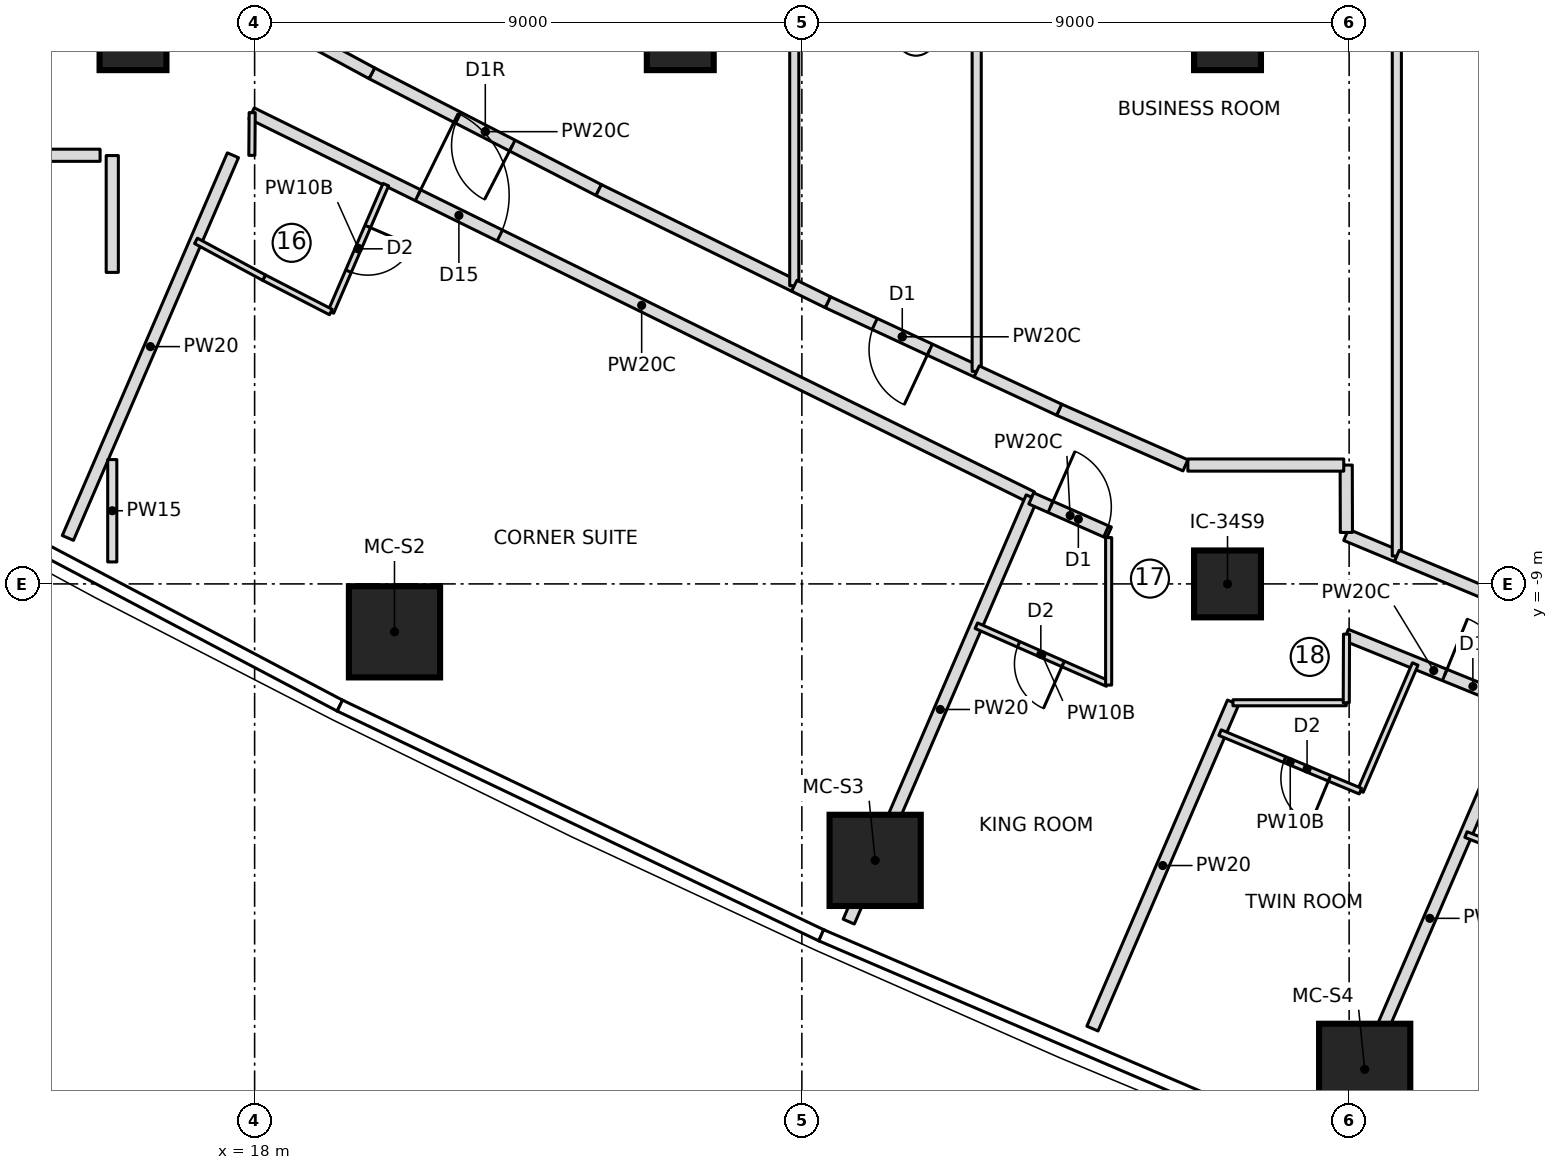
"""IFC4 building model, lengths in metres.
Left out: names, types, materials, properties, quantities, classifications, styles, units other than length and angle.
Written with IfcOpenShell. Run it as: python <this file> out.ifc"""

import sys

from ifc_helpers import new_model, si_unit, direction, frame, frame_2d, origin, origin_2d, place, context, subcontext, project, spatial, rectangle, extrude, element, fill, save


model = new_model("IFC4")
c1 = context("Model", 3, precision=1e-05, world=origin(), true_north=direction((0.0, 1.0)))
c2 = subcontext(c1, "Body", "Model", "MODEL_VIEW")
j1 = project(units=[si_unit("LENGTHUNIT", "METRE"), si_unit("PLANEANGLEUNIT", "RADIAN")], contexts=[c1])
p1 = place(None, origin())
s1 = spatial("IfcSite", under=j1, at=p1, CompositionType="ELEMENT")
p2 = place(p1, origin())
s2 = spatial("IfcBuilding", under=s1, at=p2, CompositionType="ELEMENT")
p3 = place(p2, frame((0.0, 0.0, 147.95)))
s3 = spatial("IfcBuildingStorey", under=s2, at=p3, CompositionType="ELEMENT", Elevation=147.95)
for number, where, z_axis, x_axis in (
    (1, (20.3, -9.788, 0.0), (0.0, 0.0, 1.0), (1.0, 0.0, 0.0)),
    (2, (28.205, -13.547, 0.0), (0.0, 0.0, 1.0), (1.0, 0.0, 0.0)),
    (3, (36.256, -16.984, 0.0), (0.0, 0.0, 1.0), (1.0, 0.0, 0.0)),
):
    element("IfcColumn", number, at=place(p3, frame(where, z_axis=z_axis, x_axis=x_axis)), inside=s3, PredefinedType="COLUMN", context=c2, shape_type="SweptSolid", body=[
        extrude(rectangle(XDim=1.5, YDim=1.5, at=origin_2d()), origin(), (0.0, 0.0, 1.0), 3.55),
    ])
for number, where, z_axis, x_axis in (
    (4, (16.0, 0.0, 0.0), (0.0, 0.0, 1.0), (1.0, 0.0, 0.0)),
    (5, (25.0, 0.0, 0.0), (0.0, 0.0, 1.0), (1.0, 0.0, 0.0)),
    (6, (34.0, -9.0, 0.0), (0.0, 0.0, 1.0), (1.0, 0.0, 0.0)),
    (7, (34.0, 0.0, 0.0), (0.0, 0.0, 1.0), (1.0, 0.0, 0.0)),
):
    element("IfcColumn", number, at=place(p3, frame(where, z_axis=z_axis, x_axis=x_axis)), inside=s3, PredefinedType="COLUMN", context=c2, shape_type="SweptSolid", body=[
        extrude(rectangle(XDim=1.1, YDim=1.1, at=origin_2d()), origin(), (0.0, 0.0, 1.0), 3.55),
    ])
p4 = place(p3, frame((5.654, -1.95, 0.0), z_axis=(0.0, 0.0, 1.0), x_axis=(1.0, 0.0, 0.0)))
e8 = element("IfcWall", 8, at=p4, inside=s3, PredefinedType="PARTITIONING", context=c2, shape_type="SweptSolid", body=[
    extrude(rectangle(XDim=9.804, YDim=0.2, at=frame_2d((4.902, 0.0))), origin(), (0.0, 0.0, 1.0), 3.25),
])
p5 = place(p4, frame((4.618, 0.0, 0.0)))
e9 = element("IfcOpeningElement", 9, at=p5, cuts=e8, PredefinedType="OPENING", context=c2, shape_type="SweptSolid", body=[
    extrude(rectangle(XDim=1.0, YDim=2.1, at=frame_2d((0.5, 1.05))), frame((0.0, 0.11, 0.0), z_axis=(0.0, -1.0, 0.0), x_axis=(1.0, 0.0, 0.0)), (0.0, 0.0, 1.0), 0.22),
])
p6 = place(p3, frame((14.929, -8.244, 0.0), z_axis=(0.0, 0.0, 1.0), x_axis=(0.395994543879, 0.918252863441, 0.0)))
e10 = element("IfcWall", 10, at=p6, inside=s3, PredefinedType="PARTITIONING", context=c2, shape_type="SweptSolid", body=[
    extrude(rectangle(XDim=6.854, YDim=0.2, at=frame_2d((3.427, 0.0))), origin(), (0.0, 0.0, 1.0), 3.25),
])
p7 = place(p3, frame((17.95, -1.261, 0.0), z_axis=(0.0, 0.0, 1.0), x_axis=(0.897223022069, -0.441577681353, 0.0)))
e11 = element("IfcWall", 11, at=p7, inside=s3, PredefinedType="PARTITIONING", context=c2, shape_type="SweptSolid", body=[
    extrude(rectangle(XDim=14.3, YDim=0.2, at=frame_2d((7.15, 0.0))), origin(), (0.0, 0.0, 1.0), 3.25),
])
p8 = place(p7, frame((3.05, 0.0, 0.0)))
e12 = element("IfcOpeningElement", 12, at=p8, cuts=e11, PredefinedType="OPENING", context=c2, shape_type="SweptSolid", body=[
    extrude(rectangle(XDim=1.5, YDim=2.1, at=frame_2d((0.75, 1.05))), frame((0.0, 0.11, 0.0), z_axis=(0.0, -1.0, 0.0), x_axis=(1.0, 0.0, 0.0)), (0.0, 0.0, 1.0), 0.22),
])
p9 = place(p3, frame((20.157, -2.433, 0.0), z_axis=(0.0, 0.0, 1.0), x_axis=(-0.395958457437, -0.9182684248, 0.0)))
e13 = element("IfcWall", 13, at=p9, inside=s3, PredefinedType="PARTITIONING", context=c2, shape_type="SweptSolid", body=[
    extrude(rectangle(XDim=2.282, YDim=0.1, at=frame_2d((1.141, 0.0))), origin(), (0.0, 0.0, 1.0), 3.25),
])
p10 = place(p9, frame((0.75, 0.0, 0.0)))
e14 = element("IfcOpeningElement", 14, at=p10, cuts=e13, PredefinedType="OPENING", context=c2, shape_type="SweptSolid", body=[
    extrude(rectangle(XDim=0.8, YDim=2.1, at=frame_2d((0.4, 1.05))), frame((0.0, 0.06, 0.0), z_axis=(0.0, -1.0, 0.0), x_axis=(1.0, 0.0, 0.0)), (0.0, 0.0, 1.0), 0.12),
])
p11 = place(p3, frame((19.253, -4.529, 0.0), z_axis=(0.0, 0.0, 1.0), x_axis=(-0.889106231322, 0.457700895154, 0.0)))
e15 = element("IfcWall", 15, at=p11, inside=s3, PredefinedType="PARTITIONING", context=c2, shape_type="SweptSolid", body=[
    extrude(rectangle(XDim=1.235, YDim=0.1, at=frame_2d((0.617, 0.0))), origin(), (0.0, 0.0, 1.0), 3.25),
])
p12 = place(p3, frame((18.156, -3.963, 0.0), z_axis=(0.0, 0.0, 1.0), x_axis=(-0.879823588489, 0.475300382009, 0.0)))
e16 = element("IfcWall", 16, at=p12, inside=s3, PredefinedType="PARTITIONING", context=c2, shape_type="SweptSolid", body=[
    extrude(rectangle(XDim=1.273, YDim=0.1, at=frame_2d((0.636, 0.0))), origin(), (0.0, 0.0, 1.0), 3.25),
])
p13 = place(p3, frame((27.771, -14.554, 0.0), z_axis=(0.0, 0.0, 1.0), x_axis=(0.396004020147, 0.918248776763, 0.0)))
e17 = element("IfcWall", 17, at=p13, inside=s3, PredefinedType="PARTITIONING", context=c2, shape_type="SweptSolid", body=[
    extrude(rectangle(XDim=7.6, YDim=0.2, at=frame_2d((3.8, 0.0))), origin(), (0.0, 0.0, 1.0), 3.25),
])
p14 = place(p3, frame((30.772, -7.594, 0.0), z_axis=(0.0, 0.0, 1.0), x_axis=(0.915155082005, -0.403101942293, 0.0)))
e18 = element("IfcWall", 18, at=p14, inside=s3, PredefinedType="PARTITIONING", context=c2, shape_type="SweptSolid", body=[
    extrude(rectangle(XDim=1.396, YDim=0.2, at=frame_2d((0.698, 0.0))), origin(), (0.0, 0.0, 1.0), 3.25),
])
p15 = place(p14, frame((0.346, 0.0, 0.0)))
e19 = element("IfcOpeningElement", 19, at=p15, cuts=e18, PredefinedType="OPENING", context=c2, shape_type="SweptSolid", body=[
    extrude(rectangle(XDim=1.0, YDim=2.1, at=frame_2d((0.5, 1.05))), frame((0.0, 0.11, 0.0), z_axis=(0.0, -1.0, 0.0), x_axis=(1.0, 0.0, 0.0)), (0.0, 0.0, 1.0), 0.22),
])
p16 = place(p3, frame((32.028, -10.638, 0.0), z_axis=(0.0, 0.0, 1.0), x_axis=(-0.915108845766, 0.403206895278, 0.0)))
e20 = element("IfcWall", 20, at=p16, inside=s3, PredefinedType="PARTITIONING", context=c2, shape_type="SweptSolid", body=[
    extrude(rectangle(XDim=2.358, YDim=0.1, at=frame_2d((1.179, 0.0))), origin(), (0.0, 0.0, 1.0), 3.25),
])
p17 = place(p16, frame((0.8, 0.0, 0.0)))
e21 = element("IfcOpeningElement", 21, at=p17, cuts=e20, PredefinedType="OPENING", context=c2, shape_type="SweptSolid", body=[
    extrude(rectangle(XDim=0.8, YDim=2.1, at=frame_2d((0.4, 1.05))), frame((0.0, 0.06, 0.0), z_axis=(0.0, -1.0, 0.0), x_axis=(1.0, 0.0, 0.0)), (0.0, 0.0, 1.0), 0.12),
])
p18 = place(p3, frame((31.779, -16.313, 0.0), z_axis=(0.0, 0.0, 1.0), x_axis=(0.395991607501, 0.918254129742, 0.0)))
e22 = element("IfcWall", 22, at=p18, inside=s3, PredefinedType="PARTITIONING", context=c2, shape_type="SweptSolid", body=[
    extrude(rectangle(XDim=5.841, YDim=0.2, at=frame_2d((2.92, 0.0))), origin(), (0.0, 0.0, 1.0), 3.25),
])
p19 = place(p3, frame((35.95, -9.84, 0.0), z_axis=(0.0, 0.0, 1.0), x_axis=(0.926663171188, -0.375892760191, 0.0)))
e23 = element("IfcWall", 23, at=p19, inside=s3, PredefinedType="PARTITIONING", context=c2, shape_type="SweptSolid", body=[
    extrude(rectangle(XDim=3.11, YDim=0.2, at=frame_2d((1.555, 0.0))), origin(), (0.0, 0.0, 1.0), 3.25),
])
p20 = place(p19, frame((1.75, 0.0, 0.0)))
e24 = element("IfcOpeningElement", 24, at=p20, cuts=e23, PredefinedType="OPENING", context=c2, shape_type="SweptSolid", body=[
    extrude(rectangle(XDim=1.0, YDim=2.1, at=frame_2d((0.5, 1.05))), frame((0.0, 0.11, 0.0), z_axis=(0.0, -1.0, 0.0), x_axis=(1.0, 0.0, 0.0)), (0.0, 0.0, 1.0), 0.22),
])
p21 = place(p3, frame((37.087, -10.317, 0.0), z_axis=(0.0, 0.0, 1.0), x_axis=(-0.395936907069, -0.918277717045, 0.0)))
e25 = element("IfcWall", 25, at=p21, inside=s3, PredefinedType="PARTITIONING", context=c2, shape_type="SweptSolid", body=[
    extrude(rectangle(XDim=2.277, YDim=0.1, at=frame_2d((1.139, 0.0))), origin(), (0.0, 0.0, 1.0), 3.25),
])
p22 = place(p3, frame((36.185, -12.408, 0.0), z_axis=(0.0, 0.0, 1.0), x_axis=(-0.923033583854, 0.384719382248, 0.0)))
e26 = element("IfcWall", 26, at=p22, inside=s3, PredefinedType="PARTITIONING", context=c2, shape_type="SweptSolid", body=[
    extrude(rectangle(XDim=2.5, YDim=0.1, at=frame_2d((1.25, 0.0))), origin(), (0.0, 0.0, 1.0), 3.25),
])
p23 = place(p22, frame((0.55, 0.0, 0.0)))
e27 = element("IfcOpeningElement", 27, at=p23, cuts=e26, PredefinedType="OPENING", context=c2, shape_type="SweptSolid", body=[
    extrude(rectangle(XDim=0.8, YDim=2.1, at=frame_2d((0.4, 1.05))), frame((0.0, 0.06, 0.0), z_axis=(0.0, -1.0, 0.0), x_axis=(1.0, 0.0, 0.0)), (0.0, 0.0, 1.0), 0.12),
])
p24 = place(p3, frame((35.821, -17.991, 0.0), z_axis=(0.0, 0.0, 1.0), x_axis=(0.395987603644, 0.918255856371, 0.0)))
e28 = element("IfcWall", 28, at=p24, inside=s3, PredefinedType="PARTITIONING", context=c2, shape_type="SweptSolid", body=[
    extrude(rectangle(XDim=7.604, YDim=0.2, at=frame_2d((3.802, 0.0))), origin(), (0.0, 0.0, 1.0), 3.25),
])
p25 = place(p3, frame((40.249, -14.038, 0.0), z_axis=(0.0, 0.0, 1.0), x_axis=(-0.930555592459, 0.366150637503, 0.0)))
e29 = element("IfcWall", 29, at=p25, inside=s3, PredefinedType="PARTITIONING", context=c2, shape_type="SweptSolid", body=[
    extrude(rectangle(XDim=2.501, YDim=0.1, at=frame_2d((1.25, 0.0))), origin(), (0.0, 0.0, 1.0), 3.25),
])
p26 = place(p25, frame((0.85, 0.0, 0.0)))
e30 = element("IfcOpeningElement", 30, at=p26, cuts=e29, PredefinedType="OPENING", context=c2, shape_type="SweptSolid", body=[
    extrude(rectangle(XDim=0.8, YDim=2.1, at=frame_2d((0.4, 1.05))), frame((0.0, 0.06, 0.0), z_axis=(0.0, -1.0, 0.0), x_axis=(1.0, 0.0, 0.0)), (0.0, 0.0, 1.0), 0.12),
])
p27 = place(p3, frame((23.659, -2.522, 0.0), z_axis=(0.0, 0.0, 1.0), x_axis=(-0.889140337289, 0.457634636589, 0.0)))
e31 = element("IfcWall", 31, at=p27, inside=s3, PredefinedType="PARTITIONING", context=c2, shape_type="SweptSolid", body=[
    extrude(rectangle(XDim=4.195, YDim=0.2, at=frame_2d((2.098, 0.0))), origin(), (0.0, 0.0, 1.0), 3.25),
])
p28 = place(p27, frame((1.598, 0.0, 0.0)))
e32 = element("IfcOpeningElement", 32, at=p28, cuts=e31, PredefinedType="OPENING", context=c2, shape_type="SweptSolid", body=[
    extrude(rectangle(XDim=1.0, YDim=2.1, at=frame_2d((0.5, 1.05))), frame((0.0, 0.11, 0.0), z_axis=(0.0, -1.0, 0.0), x_axis=(1.0, 0.0, 0.0)), (0.0, 0.0, 1.0), 0.22),
])
p29 = place(p3, frame((19.928, -0.602, 0.0), z_axis=(0.0, 0.0, 1.0), x_axis=(-0.879832865766, 0.475283208538, 0.0)))
e33 = element("IfcWall", 33, at=p29, inside=s3, PredefinedType="PARTITIONING", context=c2, shape_type="SweptSolid", body=[
    extrude(rectangle(XDim=1.267, YDim=0.2, at=frame_2d((0.633, 0.0))), origin(), (0.0, 0.0, 1.0), 3.25),
])
p30 = place(p3, frame((26.875, -4.096, 0.0), z_axis=(0.0, 0.0, 1.0), x_axis=(-0.898158871209, 0.439671061214, 0.0)))
e34 = element("IfcWall", 34, at=p30, inside=s3, PredefinedType="PARTITIONING", context=c2, shape_type="SweptSolid", body=[
    extrude(rectangle(XDim=3.581, YDim=0.2, at=frame_2d((1.791, 0.0))), origin(), (0.0, 0.0, 1.0), 3.25),
])
p31 = place(p3, frame((26.875, -4.096, 0.0), z_axis=(0.0, 0.0, 1.0), x_axis=(0.0, 1.0, 0.0)))
e35 = element("IfcWall", 35, at=p31, inside=s3, PredefinedType="PARTITIONING", context=c2, shape_type="SweptSolid", body=[
    extrude(rectangle(XDim=8.193, YDim=0.15, at=frame_2d((4.096, 0.0))), origin(), (0.0, 0.0, 1.0), 3.25),
])
p32 = place(p3, frame((29.875, -5.505, 0.0), z_axis=(0.0, 0.0, 1.0), x_axis=(-0.906831253463, 0.421493864419, 0.0)))
e36 = element("IfcWall", 36, at=p32, inside=s3, PredefinedType="PARTITIONING", context=c2, shape_type="SweptSolid", body=[
    extrude(rectangle(XDim=2.7, YDim=0.2, at=frame_2d((1.35, 0.0))), origin(), (0.0, 0.0, 1.0), 3.25),
])
p33 = place(p32, frame((0.85, 0.0, 0.0)))
e37 = element("IfcOpeningElement", 37, at=p33, cuts=e36, PredefinedType="OPENING", context=c2, shape_type="SweptSolid", body=[
    extrude(rectangle(XDim=1.0, YDim=2.1, at=frame_2d((0.5, 1.05))), frame((0.0, 0.11, 0.0), z_axis=(0.0, -1.0, 0.0), x_axis=(1.0, 0.0, 0.0)), (0.0, 0.0, 1.0), 0.22),
])
p34 = place(p3, frame((27.427, -4.367, 0.0), z_axis=(0.0, 0.0, 1.0), x_axis=(-0.898053097245, 0.439887070199, 0.0)))
e38 = element("IfcWall", 38, at=p34, inside=s3, PredefinedType="PARTITIONING", context=c2, shape_type="SweptSolid", body=[
    extrude(rectangle(XDim=0.615, YDim=0.2, at=frame_2d((0.307, 0.0))), origin(), (0.0, 0.0, 1.0), 3.25),
])
p35 = place(p3, frame((29.875, -5.505, 0.0), z_axis=(0.0, 0.0, 1.0), x_axis=(0.0, 1.0, 0.0)))
e39 = element("IfcWall", 39, at=p35, inside=s3, PredefinedType="PARTITIONING", context=c2, shape_type="SweptSolid", body=[
    extrude(rectangle(XDim=11.009, YDim=0.15, at=frame_2d((5.505, 0.0))), origin(), (0.0, 0.0, 1.0), 3.25),
])
p36 = place(p3, frame((36.784, -8.541, 0.0), z_axis=(0.0, 0.0, 1.0), x_axis=(-0.922997009646, 0.384807120756, 0.0)))
e40 = element("IfcWall", 40, at=p36, inside=s3, PredefinedType="PARTITIONING", context=c2, shape_type="SweptSolid", body=[
    extrude(rectangle(XDim=0.904, YDim=0.2, at=frame_2d((0.452, 0.0))), origin(), (0.0, 0.0, 1.0), 3.25),
])
p37 = place(p3, frame((33.308, -7.05, 0.0), z_axis=(0.0, 0.0, 1.0), x_axis=(-0.915102334452, 0.403221672881, 0.0)))
e41 = element("IfcWall", 41, at=p37, inside=s3, PredefinedType="PARTITIONING", context=c2, shape_type="SweptSolid", body=[
    extrude(rectangle(XDim=2.269, YDim=0.2, at=frame_2d((1.135, 0.0))), origin(), (0.0, 0.0, 1.0), 3.25),
])
p38 = place(p3, frame((31.231, -6.135, 0.0), z_axis=(0.0, 0.0, 1.0), x_axis=(-0.90682850945, 0.421499768029, 0.0)))
e42 = element("IfcWall", 42, at=p38, inside=s3, PredefinedType="PARTITIONING", context=c2, shape_type="SweptSolid", body=[
    extrude(rectangle(XDim=1.496, YDim=0.2, at=frame_2d((0.748, 0.0))), origin(), (0.0, 0.0, 1.0), 3.25),
])
p39 = place(p3, frame((36.784, -8.541, 0.0), z_axis=(0.0, 0.0, 1.0), x_axis=(0.0, 1.0, 0.0)))
e43 = element("IfcWall", 43, at=p39, inside=s3, PredefinedType="PARTITIONING", context=c2, shape_type="SweptSolid", body=[
    extrude(rectangle(XDim=17.082, YDim=0.15, at=frame_2d((8.541, 0.0))), origin(), (0.0, 0.0, 1.0), 3.25),
])
p40 = place(p3, frame((38.943, -9.441, 0.0), z_axis=(0.0, 0.0, 1.0), x_axis=(-0.923008963065, 0.384778448073, 0.0)))
e44 = element("IfcWall", 44, at=p40, inside=s3, PredefinedType="PARTITIONING", context=c2, shape_type="SweptSolid", body=[
    extrude(rectangle(XDim=2.339, YDim=0.2, at=frame_2d((1.169, 0.0))), origin(), (0.0, 0.0, 1.0), 3.25),
])
p41 = place(p3, frame((15.659, -6.955, 0.0), z_axis=(0.0, 0.0, 1.0), x_axis=(0.0, -1.0, 0.0)))
e45 = element("IfcWall", 45, at=p41, inside=s3, PredefinedType="PARTITIONING", context=c2, shape_type="SweptSolid", body=[
    extrude(rectangle(XDim=1.684, YDim=0.15, at=frame_2d((0.842, 0.0))), origin(), (0.0, 0.0, 1.0), 3.25),
])
p42 = place(p3, frame((17.955, -1.952, 0.0), z_axis=(0.0, 0.0, 1.0), x_axis=(0.007291472831, 0.999973416859, 0.0)))
e46 = element("IfcWall", 46, at=p42, inside=s3, PredefinedType="PARTITIONING", context=c2, shape_type="SweptSolid", body=[
    extrude(rectangle(XDim=0.703, YDim=0.1, at=frame_2d((0.352, 0.0))), origin(), (0.0, 0.0, 1.0), 3.25),
])
p43 = place(p3, frame((32.045, -8.238, 0.0), z_axis=(0.0, 0.0, 1.0), x_axis=(0.0, -1.0, 0.0)))
e47 = element("IfcWall", 47, at=p43, inside=s3, PredefinedType="PARTITIONING", context=c2, shape_type="SweptSolid", body=[
    extrude(rectangle(XDim=2.426, YDim=0.1, at=frame_2d((1.213, 0.0))), origin(), (0.0, 0.0, 1.0), 3.25),
])
p44 = place(p3, frame((34.089, -10.955, 0.0), z_axis=(0.0, 0.0, 1.0), x_axis=(0.999999862691, 0.000524040279, 0.0)))
e48 = element("IfcWall", 48, at=p44, inside=s3, PredefinedType="PARTITIONING", context=c2, shape_type="SweptSolid", body=[
    extrude(rectangle(XDim=1.864, YDim=0.1, at=frame_2d((0.932, 0.0))), origin(), (0.0, 0.0, 1.0), 3.25),
])
p45 = place(p3, frame((35.953, -10.954, 0.0), z_axis=(0.0, 0.0, 1.0), x_axis=(0.00368122235, 0.999993224278, 0.0)))
e49 = element("IfcWall", 49, at=p45, inside=s3, PredefinedType="PARTITIONING", context=c2, shape_type="SweptSolid", body=[
    extrude(rectangle(XDim=1.127, YDim=0.1, at=frame_2d((0.564, 0.0))), origin(), (0.0, 0.0, 1.0), 3.25),
])
p46 = place(p3, frame((35.955, -8.154, 0.0), z_axis=(0.0, 0.0, 1.0), x_axis=(-0.002643744892, 0.9999965053, 0.0)))
e50 = element("IfcWall", 50, at=p46, inside=s3, PredefinedType="PARTITIONING", context=c2, shape_type="SweptSolid", body=[
    extrude(rectangle(XDim=1.108, YDim=0.2, at=frame_2d((0.554, 0.0))), origin(), (0.0, 0.0, 1.0), 3.25),
])
p47 = place(p3, frame((35.912, -7.045, 0.0), z_axis=(0.0, 0.0, 1.0), x_axis=(-0.999999981873, 0.000190403652, 0.0)))
e51 = element("IfcWall", 51, at=p47, inside=s3, PredefinedType="PARTITIONING", context=c2, shape_type="SweptSolid", body=[
    extrude(rectangle(XDim=2.564, YDim=0.2, at=frame_2d((1.282, 0.0))), origin(), (0.0, 0.0, 1.0), 3.25),
])
p48 = place(p3, frame((15.659, -1.955, 0.0), z_axis=(0.0, 0.0, 1.0), x_axis=(0.0, -1.0, 0.0)))
e52 = element("IfcWall", 52, at=p48, inside=s3, PredefinedType="PARTITIONING", context=c2, shape_type="SweptSolid", body=[
    extrude(rectangle(XDim=1.922, YDim=0.2, at=frame_2d((0.961, 0.0))), origin(), (0.0, 0.0, 1.0), 3.25),
])
p49 = place(p10, origin())
e53 = element("IfcDoor", 53, at=p49, inside=s3, OperationType="SINGLE_SWING_LEFT", PredefinedType="DOOR", context=c2, shape_type="SweptSolid", body=[
    extrude(rectangle(XDim=0.8, YDim=2.1, at=frame_2d((0.4, 1.05))), frame((0.0, 0.025, 0.0), z_axis=(0.0, -1.0, 0.0), x_axis=(1.0, 0.0, 0.0)), (0.0, 0.0, 1.0), 0.05),
])
fill(e14, e53)
p50 = place(p8, origin())
e54 = element("IfcDoor", 54, at=p50, inside=s3, OperationType="DOUBLE_DOOR_SINGLE_SWING", PredefinedType="DOOR", context=c2, shape_type="SweptSolid", body=[
    extrude(rectangle(XDim=1.5, YDim=2.1, at=frame_2d((0.75, 1.05))), frame((0.0, 0.025, 0.0), z_axis=(0.0, -1.0, 0.0), x_axis=(1.0, 0.0, 0.0)), (0.0, 0.0, 1.0), 0.05),
])
fill(e12, e54)
p51 = place(p17, origin())
e55 = element("IfcDoor", 55, at=p51, inside=s3, OperationType="SINGLE_SWING_LEFT", PredefinedType="DOOR", context=c2, shape_type="SweptSolid", body=[
    extrude(rectangle(XDim=0.8, YDim=2.1, at=frame_2d((0.4, 1.05))), frame((0.0, 0.025, 0.0), z_axis=(0.0, -1.0, 0.0), x_axis=(1.0, 0.0, 0.0)), (0.0, 0.0, 1.0), 0.05),
])
fill(e21, e55)
p52 = place(p15, origin())
e56 = element("IfcDoor", 56, at=p52, inside=s3, OperationType="SINGLE_SWING_LEFT", PredefinedType="DOOR", context=c2, shape_type="SweptSolid", body=[
    extrude(rectangle(XDim=1.0, YDim=2.1, at=frame_2d((0.5, 1.05))), frame((0.0, 0.025, 0.0), z_axis=(0.0, -1.0, 0.0), x_axis=(1.0, 0.0, 0.0)), (0.0, 0.0, 1.0), 0.05),
])
fill(e19, e56)
p53 = place(p23, origin())
e57 = element("IfcDoor", 57, at=p53, inside=s3, OperationType="SINGLE_SWING_LEFT", PredefinedType="DOOR", context=c2, shape_type="SweptSolid", body=[
    extrude(rectangle(XDim=0.8, YDim=2.1, at=frame_2d((0.4, 1.05))), frame((0.0, 0.025, 0.0), z_axis=(0.0, -1.0, 0.0), x_axis=(1.0, 0.0, 0.0)), (0.0, 0.0, 1.0), 0.05),
])
fill(e27, e57)
p54 = place(p20, origin())
e58 = element("IfcDoor", 58, at=p54, inside=s3, OperationType="SINGLE_SWING_LEFT", PredefinedType="DOOR", context=c2, shape_type="SweptSolid", body=[
    extrude(rectangle(XDim=1.0, YDim=2.1, at=frame_2d((0.5, 1.05))), frame((0.0, 0.025, 0.0), z_axis=(0.0, -1.0, 0.0), x_axis=(1.0, 0.0, 0.0)), (0.0, 0.0, 1.0), 0.05),
])
fill(e24, e58)
p55 = place(p28, origin())
e59 = element("IfcDoor", 59, at=p55, inside=s3, OperationType="SINGLE_SWING_RIGHT", PredefinedType="DOOR", context=c2, shape_type="SweptSolid", body=[
    extrude(rectangle(XDim=1.0, YDim=2.1, at=frame_2d((0.5, 1.05))), frame((0.0, 0.025, 0.0), z_axis=(0.0, -1.0, 0.0), x_axis=(1.0, 0.0, 0.0)), (0.0, 0.0, 1.0), 0.05),
])
fill(e32, e59)
p56 = place(p33, origin())
e60 = element("IfcDoor", 60, at=p56, inside=s3, OperationType="SINGLE_SWING_LEFT", PredefinedType="DOOR", context=c2, shape_type="SweptSolid", body=[
    extrude(rectangle(XDim=1.0, YDim=2.1, at=frame_2d((0.5, 1.05))), frame((0.0, 0.025, 0.0), z_axis=(0.0, -1.0, 0.0), x_axis=(1.0, 0.0, 0.0)), (0.0, 0.0, 1.0), 0.05),
])
fill(e37, e60)
save(model, sys.argv[1])
